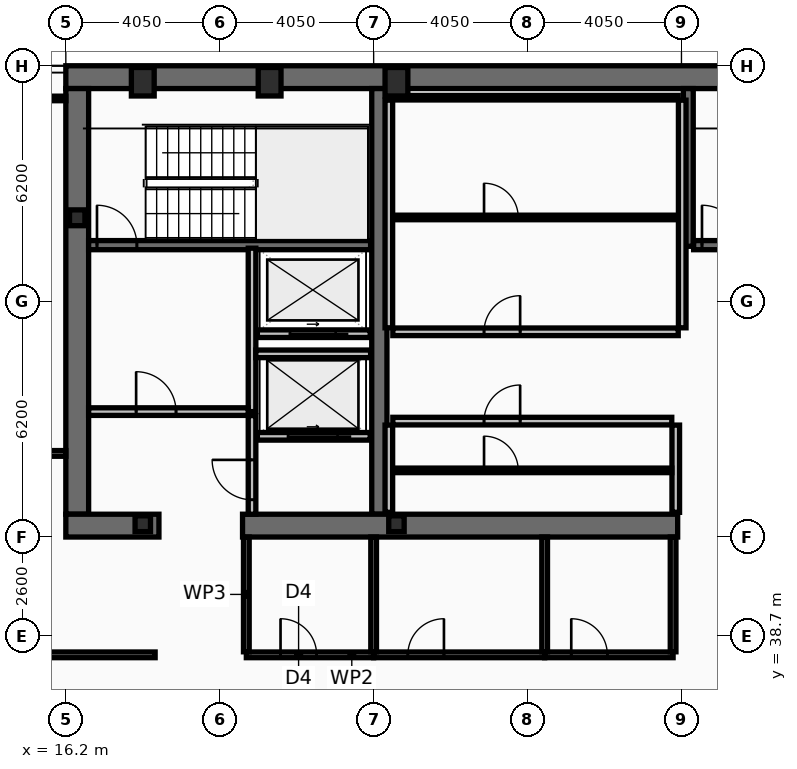
"""IFC4 building model, lengths in metres.
Left out: names, types, materials, properties, quantities, classifications, styles, units other than length and angle.
Written with IfcOpenShell. Run it as: python <this file> out.ifc"""

import sys

from ifc_helpers import new_model, si_unit, direction, frame, frame_2d, origin, origin_2d, place, context, subcontext, project, spatial, rectangle, hollow_rectangle, i_section, extrude, element, fill, save


model = new_model("IFC4")
c1 = context("Model", 3, precision=1e-05, world=origin(), true_north=direction((0.0, 1.0)))
c2 = subcontext(c1, "Body", "Model", "MODEL_VIEW")
j1 = project(units=[si_unit("LENGTHUNIT", "METRE"), si_unit("PLANEANGLEUNIT", "RADIAN")], contexts=[c1])
p1 = place(None, origin())
s1 = spatial("IfcSite", under=j1, at=p1, CompositionType="ELEMENT")
p2 = place(p1, origin())
s2 = spatial("IfcBuilding", under=s1, at=p2, CompositionType="ELEMENT")
p3 = place(p2, frame((0.0, 0.0, 192.2)))
s3 = spatial("IfcBuildingStorey", under=s2, at=p3, CompositionType="ELEMENT", Elevation=192.2)
p4 = place(p3, frame((16.2, 53.4, 0.0), z_axis=(0.0, 0.0, 1.0), x_axis=(1.0, 0.0, 0.0)))
e1 = element("IfcWall", 1, at=p4, inside=s3, PredefinedType="SHEAR", context=c2, shape_type="SweptSolid", body=[
    extrude(rectangle(XDim=40.5, YDim=0.6, at=frame_2d((20.25, 0.0))), origin(), (0.0, 0.0, 1.0), 3.44),
])
p5 = place(p3, frame((16.5, 41.9, 0.0), z_axis=(0.0, 0.0, 1.0), x_axis=(0.0, 1.0, 0.0)))
e2 = element("IfcWall", 2, at=p5, inside=s3, PredefinedType="SHEAR", context=c2, shape_type="SweptSolid", body=[
    extrude(rectangle(XDim=11.2, YDim=0.6, at=frame_2d((5.6, 0.0))), origin(), (0.0, 0.0, 1.0), 3.44),
])
p6 = place(p3, frame((24.45, 41.9, 0.0), z_axis=(0.0, 0.0, 1.0), x_axis=(0.0, 1.0, 0.0)))
e3 = element("IfcWall", 3, at=p6, inside=s3, PredefinedType="SHEAR", context=c2, shape_type="SweptSolid", body=[
    extrude(rectangle(XDim=11.2, YDim=0.4, at=frame_2d((5.6, 0.0))), origin(), (0.0, 0.0, 1.0), 3.44),
])
p7 = place(p3, frame((18.65, 41.6, 0.0), z_axis=(0.0, 0.0, 1.0), x_axis=(-1.0, 0.0, 0.0)))
e4 = element("IfcWall", 4, at=p7, inside=s3, PredefinedType="SHEAR", context=c2, shape_type="SweptSolid", body=[
    extrude(rectangle(XDim=2.45, YDim=0.6, at=frame_2d((1.225, 0.0))), origin(), (0.0, 0.0, 1.0), 3.44),
])
p8 = place(p3, frame((32.3, 41.6, 0.0), z_axis=(0.0, 0.0, 1.0), x_axis=(-1.0, 0.0, 0.0)))
e5 = element("IfcWall", 5, at=p8, inside=s3, PredefinedType="SHEAR", context=c2, shape_type="SweptSolid", body=[
    extrude(rectangle(XDim=11.45, YDim=0.6, at=frame_2d((5.725, 0.0))), origin(), (0.0, 0.0, 1.0), 3.44),
])
p9 = place(p3, frame((32.58, 48.95, 0.0), z_axis=(0.0, 0.0, 1.0), x_axis=(0.0, 1.0, 0.0)))
e6 = element("IfcWall", 6, at=p9, inside=s3, PredefinedType="SHEAR", context=c2, shape_type="SweptSolid", body=[
    extrude(rectangle(XDim=4.15, YDim=0.26, at=frame_2d((2.075, 0.0))), origin(), (0.0, 0.0, 1.0), 3.44),
])
p10 = place(p3, frame((16.8, 48.98, 0.0), z_axis=(0.0, 0.0, 1.0), x_axis=(1.0, 0.0, 0.0)))
e7 = element("IfcWall", 7, at=p10, inside=s3, PredefinedType="SHEAR", context=c2, shape_type="SweptSolid", body=[
    extrude(rectangle(XDim=7.42, YDim=0.24, at=frame_2d((3.71, 0.0))), origin(), (0.0, 0.0, 1.0), 3.44),
])
p11 = place(p10, frame((0.22, 0.0, 0.0)))
e8 = element("IfcOpeningElement", 8, at=p11, cuts=e7, PredefinedType="OPENING", context=c2, shape_type="SweptSolid", body=[
    extrude(rectangle(XDim=1.05, YDim=2.15, at=frame_2d((0.525, 1.075))), frame((0.0, 0.13, 0.0), z_axis=(0.0, -1.0, 0.0), x_axis=(1.0, 0.0, 0.0)), (0.0, 0.0, 1.0), 0.26),
])
p12 = place(p3, frame((32.72, 48.98, 0.0), z_axis=(0.0, 0.0, 1.0), x_axis=(1.0, 0.0, 0.0)))
e9 = element("IfcWall", 9, at=p12, inside=s3, PredefinedType="SHEAR", context=c2, shape_type="SweptSolid", body=[
    extrude(rectangle(XDim=7.56, YDim=0.24, at=frame_2d((3.78, 0.0))), origin(), (0.0, 0.0, 1.0), 3.44),
])
p13 = place(p12, frame((0.22, 0.0, 0.0)))
e10 = element("IfcOpeningElement", 10, at=p13, cuts=e9, PredefinedType="OPENING", context=c2, shape_type="SweptSolid", body=[
    extrude(rectangle(XDim=1.05, YDim=2.15, at=frame_2d((0.525, 1.075))), frame((0.0, 0.13, 0.0), z_axis=(0.0, -1.0, 0.0), x_axis=(1.0, 0.0, 0.0)), (0.0, 0.0, 1.0), 0.26),
])
for number, where, z_axis, x_axis in (
    (11, (18.225, 53.28, 0.0), (0.0, 0.0, 1.0), (1.0, 0.0, 0.0)),
    (12, (21.562, 53.28, 0.0), (0.0, 0.0, 1.0), (1.0, 0.0, 0.0)),
    (13, (24.9, 53.28, 0.0), (0.0, 0.0, 1.0), (1.0, 0.0, 0.0)),
):
    element("IfcColumn", number, at=place(p3, frame(where, z_axis=z_axis, x_axis=x_axis)), inside=s3, PredefinedType="COLUMN", context=c2, shape_type="SweptSolid", body=[
        extrude(hollow_rectangle(XDim=0.6, YDim=0.75, WallThickness=0.045, at=origin_2d()), origin(), (0.0, 0.0, 1.0), 3.6),
    ])
for number, where, z_axis, x_axis in (
    (14, (16.5, 49.7, 0.0), (0.0, 0.0, 1.0), (1.0, 0.0, 0.0)),
    (15, (18.225, 41.65, 0.0), (0.0, 0.0, 1.0), (1.0, 0.0, 0.0)),
    (16, (24.9, 41.65, 0.0), (0.0, 0.0, 1.0), (1.0, 0.0, 0.0)),
):
    element("IfcColumn", number, at=place(p3, frame(where, z_axis=z_axis, x_axis=x_axis)), inside=s3, PredefinedType="COLUMN", context=c2, shape_type="SweptSolid", body=[
        extrude(i_section(OverallWidth=0.406, OverallDepth=0.416, WebThickness=0.03, FlangeThickness=0.048, at=origin_2d()), origin(), (0.0, 0.0, 1.0), 3.6),
    ])
p14 = place(p3, frame((24.21, 43.95, 0.0), z_axis=(0.0, 0.0, 1.0), x_axis=(-1.0, 0.0, 0.0)))
e17 = element("IfcWall", 17, at=p14, inside=s3, PredefinedType="PARTITIONING", context=c2, shape_type="SweptSolid", body=[
    extrude(rectangle(XDim=2.97, YDim=0.2, at=frame_2d((1.485, 0.0))), origin(), (0.0, 0.0, 1.0), 3.44),
])
p15 = place(p14, frame((0.86, 0.0, 0.0)))
e18 = element("IfcOpeningElement", 18, at=p15, cuts=e17, PredefinedType="OPENING", context=c2, shape_type="SweptSolid", body=[
    extrude(rectangle(XDim=1.3, YDim=2.18, at=frame_2d((0.65, 1.09))), frame((0.0, 0.11, 0.0), z_axis=(0.0, -1.0, 0.0), x_axis=(1.0, 0.0, 0.0)), (0.0, 0.0, 1.0), 0.22),
])
p16 = place(p3, frame((24.21, 46.65, 0.0), z_axis=(0.0, 0.0, 1.0), x_axis=(-1.0, 0.0, 0.0)))
e19 = element("IfcWall", 19, at=p16, inside=s3, PredefinedType="PARTITIONING", context=c2, shape_type="SweptSolid", body=[
    extrude(rectangle(XDim=2.97, YDim=0.2, at=frame_2d((1.485, 0.0))), origin(), (0.0, 0.0, 1.0), 3.44),
])
p17 = place(p16, frame((0.91, 0.0, 0.0)))
e20 = element("IfcOpeningElement", 20, at=p17, cuts=e19, PredefinedType="OPENING", context=c2, shape_type="SweptSolid", body=[
    extrude(rectangle(XDim=1.2, YDim=2.18, at=frame_2d((0.6, 1.09))), frame((0.0, 0.11, 0.0), z_axis=(0.0, -1.0, 0.0), x_axis=(1.0, 0.0, 0.0)), (0.0, 0.0, 1.0), 0.22),
])
p18 = place(p3, frame((21.1, 44.6, 0.0), z_axis=(0.0, 0.0, 1.0), x_axis=(0.0, 1.0, 0.0)))
e21 = element("IfcWall", 21, at=p18, inside=s3, PredefinedType="PARTITIONING", context=c2, shape_type="SweptSolid", body=[
    extrude(rectangle(XDim=4.3, YDim=0.2, at=frame_2d((2.15, 0.0))), origin(), (0.0, 0.0, 1.0), 3.44),
])
p19 = place(p3, frame((16.8, 44.6, 0.0), z_axis=(0.0, 0.0, 1.0), x_axis=(1.0, 0.0, 0.0)))
e22 = element("IfcWall", 22, at=p19, inside=s3, PredefinedType="PARTITIONING", context=c2, shape_type="SweptSolid", body=[
    extrude(rectangle(XDim=4.2, YDim=0.2, at=frame_2d((2.1, 0.0))), origin(), (0.0, 0.0, 1.0), 3.44),
])
p20 = place(p19, frame((1.25, 0.0, 0.0)))
e23 = element("IfcOpeningElement", 23, at=p20, cuts=e22, PredefinedType="OPENING", context=c2, shape_type="SweptSolid", body=[
    extrude(rectangle(XDim=1.05, YDim=2.15, at=frame_2d((0.525, 1.075))), frame((0.0, 0.11, 0.0), z_axis=(0.0, -1.0, 0.0), x_axis=(1.0, 0.0, 0.0)), (0.0, 0.0, 1.0), 0.22),
])
p21 = place(p3, frame((21.2, 46.12, 0.0), z_axis=(0.0, 0.0, 1.0), x_axis=(1.0, 0.0, 0.0)))
e24 = element("IfcWall", 24, at=p21, inside=s3, PredefinedType="PARTITIONING", context=c2, shape_type="SweptSolid", body=[
    extrude(rectangle(XDim=3.02, YDim=0.2, at=frame_2d((1.51, 0.0))), origin(), (0.0, 0.0, 1.0), 3.44),
])
p22 = place(p3, frame((21.1, 41.9, 0.0), z_axis=(0.0, 0.0, 1.0), x_axis=(0.0, 1.0, 0.0)))
e25 = element("IfcWall", 25, at=p22, inside=s3, PredefinedType="PARTITIONING", context=c2, shape_type="SweptSolid", body=[
    extrude(rectangle(XDim=2.595, YDim=0.2, at=frame_2d((1.298, 0.0))), origin(), (0.0, 0.0, 1.0), 3.44),
])
p23 = place(p22, frame((0.38, 0.0, 0.0)))
e26 = element("IfcOpeningElement", 26, at=p23, cuts=e25, PredefinedType="OPENING", context=c2, shape_type="SweptSolid", body=[
    extrude(rectangle(XDim=1.05, YDim=2.15, at=frame_2d((0.525, 1.075))), frame((0.0, 0.11, 0.0), z_axis=(0.0, -1.0, 0.0), x_axis=(1.0, 0.0, 0.0)), (0.0, 0.0, 1.0), 0.22),
])
for number, where, z_axis, x_axis in (
    (27, (24.7, 46.805, 0.0), (0.0, 0.0, 1.0), (0.0, 1.0, 0.0)),
    (28, (32.42, 46.805, 0.0), (0.0, 0.0, 1.0), (0.0, 1.0, 0.0)),
):
    element("IfcWall", number, at=place(p3, frame(where, z_axis=z_axis, x_axis=x_axis)), inside=s3, PredefinedType="PARTITIONING", context=c2, shape_type="SweptSolid", body=[
        extrude(rectangle(XDim=5.99, YDim=0.2, at=frame_2d((2.995, 0.0))), origin(), (0.0, 0.0, 1.0), 3.44),
    ])
p24 = place(p3, frame((24.805, 52.86, 0.0), z_axis=(0.0, 0.0, 1.0), x_axis=(1.0, 0.0, 0.0)))
e29 = element("IfcWall", 29, at=p24, inside=s3, PredefinedType="PARTITIONING", context=c2, shape_type="SweptSolid", body=[
    extrude(rectangle(XDim=7.51, YDim=0.12, at=frame_2d((3.755, 0.0))), origin(), (0.0, 0.0, 1.0), 3.44),
])
p25 = place(p3, frame((24.805, 49.709, 0.0), z_axis=(0.0, 0.0, 1.0), x_axis=(1.0, 0.0, 0.0)))
e30 = element("IfcWall", 30, at=p25, inside=s3, PredefinedType="PARTITIONING", context=c2, shape_type="SweptSolid", body=[
    extrude(rectangle(XDim=7.51, YDim=0.12, at=frame_2d((3.755, 0.0))), origin(), (0.0, 0.0, 1.0), 3.44),
])
p26 = place(p25, frame((2.4, 0.0, 0.0)))
e31 = element("IfcOpeningElement", 31, at=p26, cuts=e30, PredefinedType="OPENING", context=c2, shape_type="SweptSolid", body=[
    extrude(rectangle(XDim=0.9, YDim=2.05, at=frame_2d((0.45, 1.025))), frame((0.0, 0.07, 0.0), z_axis=(0.0, -1.0, 0.0), x_axis=(1.0, 0.0, 0.0)), (0.0, 0.0, 1.0), 0.14),
])
p27 = place(p3, frame((24.805, 46.7, 0.0), z_axis=(0.0, 0.0, 1.0), x_axis=(1.0, 0.0, 0.0)))
e32 = element("IfcWall", 32, at=p27, inside=s3, PredefinedType="PARTITIONING", context=c2, shape_type="SweptSolid", body=[
    extrude(rectangle(XDim=7.51, YDim=0.2, at=frame_2d((3.755, 0.0))), origin(), (0.0, 0.0, 1.0), 3.44),
])
p28 = place(p27, frame((2.4, 0.0, 0.0)))
e33 = element("IfcOpeningElement", 33, at=p28, cuts=e32, PredefinedType="OPENING", context=c2, shape_type="SweptSolid", body=[
    extrude(rectangle(XDim=0.95, YDim=2.1, at=frame_2d((0.475, 1.05))), frame((0.0, 0.11, 0.0), z_axis=(0.0, -1.0, 0.0), x_axis=(1.0, 0.0, 0.0)), (0.0, 0.0, 1.0), 0.22),
])
for number, where, z_axis, x_axis in (
    (34, (24.7, 41.95, 0.0), (0.0, 0.0, 1.0), (0.0, 1.0, 0.0)),
    (35, (32.25, 41.95, 0.0), (0.0, 0.0, 1.0), (0.0, 1.0, 0.0)),
):
    element("IfcWall", number, at=place(p3, frame(where, z_axis=z_axis, x_axis=x_axis)), inside=s3, PredefinedType="PARTITIONING", context=c2, shape_type="SweptSolid", body=[
        extrude(rectangle(XDim=2.295, YDim=0.2, at=frame_2d((1.147, 0.0))), origin(), (0.0, 0.0, 1.0), 3.44),
    ])
p29 = place(p3, frame((24.805, 43.054, 0.0), z_axis=(0.0, 0.0, 1.0), x_axis=(1.0, 0.0, 0.0)))
e36 = element("IfcWall", 36, at=p29, inside=s3, PredefinedType="PARTITIONING", context=c2, shape_type="SweptSolid", body=[
    extrude(rectangle(XDim=7.34, YDim=0.12, at=frame_2d((3.67, 0.0))), origin(), (0.0, 0.0, 1.0), 3.44),
])
p30 = place(p29, frame((2.4, 0.0, 0.0)))
e37 = element("IfcOpeningElement", 37, at=p30, cuts=e36, PredefinedType="OPENING", context=c2, shape_type="SweptSolid", body=[
    extrude(rectangle(XDim=0.9, YDim=2.05, at=frame_2d((0.45, 1.025))), frame((0.0, 0.07, 0.0), z_axis=(0.0, -1.0, 0.0), x_axis=(1.0, 0.0, 0.0)), (0.0, 0.0, 1.0), 0.14),
])
p31 = place(p3, frame((24.805, 44.35, 0.0), z_axis=(0.0, 0.0, 1.0), x_axis=(1.0, 0.0, 0.0)))
e38 = element("IfcWall", 38, at=p31, inside=s3, PredefinedType="PARTITIONING", context=c2, shape_type="SweptSolid", body=[
    extrude(rectangle(XDim=7.34, YDim=0.2, at=frame_2d((3.67, 0.0))), origin(), (0.0, 0.0, 1.0), 3.44),
])
p32 = place(p31, frame((2.4, 0.0, 0.0)))
e39 = element("IfcOpeningElement", 39, at=p32, cuts=e38, PredefinedType="OPENING", context=c2, shape_type="SweptSolid", body=[
    extrude(rectangle(XDim=0.95, YDim=2.1, at=frame_2d((0.475, 1.05))), frame((0.0, 0.11, 0.0), z_axis=(0.0, -1.0, 0.0), x_axis=(1.0, 0.0, 0.0)), (0.0, 0.0, 1.0), 0.22),
])
p33 = place(p3, frame((20.95, 38.2, 0.0), z_axis=(0.0, 0.0, 1.0), x_axis=(1.0, 0.0, 0.0)))
e40 = element("IfcWall", 40, at=p33, inside=s3, PredefinedType="PARTITIONING", context=c2, shape_type="SweptSolid", body=[
    extrude(rectangle(XDim=3.35, YDim=0.15, at=frame_2d((1.675, 0.0))), origin(), (0.0, 0.0, 1.0), 3.44),
])
p34 = place(p33, frame((0.9, 0.0, 0.0)))
e41 = element("IfcOpeningElement", 41, at=p34, cuts=e40, PredefinedType="OPENING", context=c2, shape_type="SweptSolid", body=[
    extrude(rectangle(XDim=0.95, YDim=2.05, at=frame_2d((0.475, 1.025))), frame((0.0, 0.085, 0.0), z_axis=(0.0, -1.0, 0.0), x_axis=(1.0, 0.0, 0.0)), (0.0, 0.0, 1.0), 0.17),
])
p35 = place(p3, frame((24.3, 38.2, 0.0), z_axis=(0.0, 0.0, 1.0), x_axis=(1.0, 0.0, 0.0)))
e42 = element("IfcWall", 42, at=p35, inside=s3, PredefinedType="PARTITIONING", context=c2, shape_type="SweptSolid", body=[
    extrude(rectangle(XDim=4.5, YDim=0.15, at=frame_2d((2.25, 0.0))), origin(), (0.0, 0.0, 1.0), 2.73),
])
p36 = place(p35, frame((0.9, 0.0, 0.0)))
e43 = element("IfcOpeningElement", 43, at=p36, cuts=e42, PredefinedType="OPENING", context=c2, shape_type="SweptSolid", body=[
    extrude(rectangle(XDim=0.95, YDim=2.05, at=frame_2d((0.475, 1.025))), frame((0.0, 0.085, 0.0), z_axis=(0.0, -1.0, 0.0), x_axis=(1.0, 0.0, 0.0)), (0.0, 0.0, 1.0), 0.17),
])
p37 = place(p3, frame((28.8, 38.2, 0.0), z_axis=(0.0, 0.0, 1.0), x_axis=(1.0, 0.0, 0.0)))
e44 = element("IfcWall", 44, at=p37, inside=s3, PredefinedType="PARTITIONING", context=c2, shape_type="SweptSolid", body=[
    extrude(rectangle(XDim=3.38, YDim=0.15, at=frame_2d((1.69, 0.0))), origin(), (0.0, 0.0, 1.0), 2.73),
])
p38 = place(p37, frame((0.7, 0.0, 0.0)))
e45 = element("IfcOpeningElement", 45, at=p38, cuts=e44, PredefinedType="OPENING", context=c2, shape_type="SweptSolid", body=[
    extrude(rectangle(XDim=0.95, YDim=2.05, at=frame_2d((0.475, 1.025))), frame((0.0, 0.085, 0.0), z_axis=(0.0, -1.0, 0.0), x_axis=(1.0, 0.0, 0.0)), (0.0, 0.0, 1.0), 0.17),
])
for number, where, z_axis, x_axis in (
    (46, (20.95, 38.28, 0.0), (0.0, 0.0, 1.0), (0.0, 1.0, 0.0)),
    (47, (24.3, 38.28, 0.0), (0.0, 0.0, 1.0), (0.0, 1.0, 0.0)),
    (48, (28.8, 38.28, 0.0), (0.0, 0.0, 1.0), (0.0, 1.0, 0.0)),
    (49, (32.18, 38.28, 0.0), (0.0, 0.0, 1.0), (0.0, 1.0, 0.0)),
):
    element("IfcWall", number, at=place(p3, frame(where, z_axis=z_axis, x_axis=x_axis)), inside=s3, PredefinedType="PARTITIONING", context=c2, shape_type="SweptSolid", body=[
        extrude(rectangle(XDim=3.02, YDim=0.15, at=frame_2d((1.51, 0.0))), origin(), (0.0, 0.0, 1.0), 3.44),
    ])
p39 = place(p3, frame((8.03, 38.2, 0.0), z_axis=(0.0, 0.0, 1.0), x_axis=(1.0, 0.0, 0.0)))
e50 = element("IfcWall", 50, at=p39, inside=s3, PredefinedType="PARTITIONING", context=c2, shape_type="SweptSolid", body=[
    extrude(rectangle(XDim=10.52, YDim=0.15, at=frame_2d((5.26, 0.0))), origin(), (0.0, 0.0, 1.0), 2.73),
])
p40 = place(p39, frame((6.32, 0.0, 0.0)))
e51 = element("IfcOpeningElement", 51, at=p40, cuts=e50, PredefinedType="OPENING", context=c2, shape_type="SweptSolid", body=[
    extrude(rectangle(XDim=0.95, YDim=2.05, at=frame_2d((0.475, 1.025))), frame((0.0, 0.085, 0.0), z_axis=(0.0, -1.0, 0.0), x_axis=(1.0, 0.0, 0.0)), (0.0, 0.0, 1.0), 0.17),
])
p41 = place(p3, frame((8.095, 43.5, 0.0), z_axis=(0.0, 0.0, 1.0), x_axis=(1.0, 0.0, 0.0)))
e52 = element("IfcWall", 52, at=p41, inside=s3, PredefinedType="PARTITIONING", context=c2, shape_type="SweptSolid", body=[
    extrude(rectangle(XDim=8.105, YDim=0.15, at=frame_2d((4.052, 0.0))), origin(), (0.0, 0.0, 1.0), 2.73),
])
p42 = place(p41, frame((6.32, 0.0, 0.0)))
e53 = element("IfcOpeningElement", 53, at=p42, cuts=e52, PredefinedType="OPENING", context=c2, shape_type="SweptSolid", body=[
    extrude(rectangle(XDim=0.9, YDim=2.05, at=frame_2d((0.45, 1.025))), frame((0.0, 0.085, 0.0), z_axis=(0.0, -1.0, 0.0), x_axis=(1.0, 0.0, 0.0)), (0.0, 0.0, 1.0), 0.17),
])
p43 = place(p3, frame((8.095, 52.84, 0.0), z_axis=(0.0, 0.0, 1.0), x_axis=(1.0, 0.0, 0.0)))
e54 = element("IfcWall", 54, at=p43, inside=s3, PredefinedType="PARTITIONING", context=c2, shape_type="SweptSolid", body=[
    extrude(rectangle(XDim=8.105, YDim=0.12, at=frame_2d((4.052, 0.0))), origin(), (0.0, 0.0, 1.0), 3.44),
])
p44 = place(p11, origin())
e55 = element("IfcDoor", 55, at=p44, inside=s3, OperationType="SINGLE_SWING_LEFT", PredefinedType="DOOR", context=c2, shape_type="SweptSolid", body=[
    extrude(rectangle(XDim=1.05, YDim=2.15, at=frame_2d((0.525, 1.075))), frame((0.0, 0.025, 0.0), z_axis=(0.0, -1.0, 0.0), x_axis=(1.0, 0.0, 0.0)), (0.0, 0.0, 1.0), 0.05),
])
fill(e8, e55)
p45 = place(p13, origin())
e56 = element("IfcDoor", 56, at=p45, inside=s3, OperationType="SINGLE_SWING_LEFT", PredefinedType="DOOR", context=c2, shape_type="SweptSolid", body=[
    extrude(rectangle(XDim=1.05, YDim=2.15, at=frame_2d((0.525, 1.075))), frame((0.0, 0.025, 0.0), z_axis=(0.0, -1.0, 0.0), x_axis=(1.0, 0.0, 0.0)), (0.0, 0.0, 1.0), 0.05),
])
fill(e10, e56)
p46 = place(p15, origin())
e57 = element("IfcDoor", 57, at=p46, inside=s3, OperationType="SLIDING_TO_LEFT", PredefinedType="DOOR", context=c2, shape_type="SweptSolid", body=[
    extrude(rectangle(XDim=1.3, YDim=2.18, at=frame_2d((0.65, 1.09))), frame((0.0, 0.025, 0.0), z_axis=(0.0, -1.0, 0.0), x_axis=(1.0, 0.0, 0.0)), (0.0, 0.0, 1.0), 0.05),
])
fill(e18, e57)
p47 = place(p17, origin())
e58 = element("IfcDoor", 58, at=p47, inside=s3, OperationType="SLIDING_TO_LEFT", PredefinedType="DOOR", context=c2, shape_type="SweptSolid", body=[
    extrude(rectangle(XDim=1.2, YDim=2.18, at=frame_2d((0.6, 1.09))), frame((0.0, 0.025, 0.0), z_axis=(0.0, -1.0, 0.0), x_axis=(1.0, 0.0, 0.0)), (0.0, 0.0, 1.0), 0.05),
])
fill(e20, e58)
p48 = place(p20, origin())
e59 = element("IfcDoor", 59, at=p48, inside=s3, OperationType="SINGLE_SWING_LEFT", PredefinedType="DOOR", context=c2, shape_type="SweptSolid", body=[
    extrude(rectangle(XDim=1.05, YDim=2.15, at=frame_2d((0.525, 1.075))), frame((0.0, 0.025, 0.0), z_axis=(0.0, -1.0, 0.0), x_axis=(1.0, 0.0, 0.0)), (0.0, 0.0, 1.0), 0.05),
])
fill(e23, e59)
p49 = place(p23, origin())
e60 = element("IfcDoor", 60, at=p49, inside=s3, OperationType="SINGLE_SWING_RIGHT", PredefinedType="DOOR", context=c2, shape_type="SweptSolid", body=[
    extrude(rectangle(XDim=1.05, YDim=2.15, at=frame_2d((0.525, 1.075))), frame((0.0, 0.025, 0.0), z_axis=(0.0, -1.0, 0.0), x_axis=(1.0, 0.0, 0.0)), (0.0, 0.0, 1.0), 0.05),
])
fill(e26, e60)
p50 = place(p26, origin())
e61 = element("IfcDoor", 61, at=p50, inside=s3, OperationType="SINGLE_SWING_LEFT", PredefinedType="DOOR", context=c2, shape_type="SweptSolid", body=[
    extrude(rectangle(XDim=0.9, YDim=2.05, at=frame_2d((0.45, 1.025))), frame((0.0, 0.025, 0.0), z_axis=(0.0, -1.0, 0.0), x_axis=(1.0, 0.0, 0.0)), (0.0, 0.0, 1.0), 0.05),
])
fill(e31, e61)
p51 = place(p28, origin())
e62 = element("IfcDoor", 62, at=p51, inside=s3, OperationType="SINGLE_SWING_RIGHT", PredefinedType="DOOR", context=c2, shape_type="SweptSolid", body=[
    extrude(rectangle(XDim=0.95, YDim=2.1, at=frame_2d((0.475, 1.05))), frame((0.0, 0.025, 0.0), z_axis=(0.0, -1.0, 0.0), x_axis=(1.0, 0.0, 0.0)), (0.0, 0.0, 1.0), 0.05),
])
fill(e33, e62)
p52 = place(p30, origin())
e63 = element("IfcDoor", 63, at=p52, inside=s3, OperationType="SINGLE_SWING_LEFT", PredefinedType="DOOR", context=c2, shape_type="SweptSolid", body=[
    extrude(rectangle(XDim=0.9, YDim=2.05, at=frame_2d((0.45, 1.025))), frame((0.0, 0.025, 0.0), z_axis=(0.0, -1.0, 0.0), x_axis=(1.0, 0.0, 0.0)), (0.0, 0.0, 1.0), 0.05),
])
fill(e37, e63)
p53 = place(p32, origin())
e64 = element("IfcDoor", 64, at=p53, inside=s3, OperationType="SINGLE_SWING_RIGHT", PredefinedType="DOOR", context=c2, shape_type="SweptSolid", body=[
    extrude(rectangle(XDim=0.95, YDim=2.1, at=frame_2d((0.475, 1.05))), frame((0.0, 0.025, 0.0), z_axis=(0.0, -1.0, 0.0), x_axis=(1.0, 0.0, 0.0)), (0.0, 0.0, 1.0), 0.05),
])
fill(e39, e64)
p54 = place(p34, origin())
e65 = element("IfcDoor", 65, at=p54, inside=s3, OperationType="SINGLE_SWING_LEFT", PredefinedType="DOOR", context=c2, shape_type="SweptSolid", body=[
    extrude(rectangle(XDim=0.95, YDim=2.05, at=frame_2d((0.475, 1.025))), frame((0.0, 0.025, 0.0), z_axis=(0.0, -1.0, 0.0), x_axis=(1.0, 0.0, 0.0)), (0.0, 0.0, 1.0), 0.05),
])
fill(e41, e65)
p55 = place(p36, origin())
e66 = element("IfcDoor", 66, at=p55, inside=s3, OperationType="SINGLE_SWING_RIGHT", PredefinedType="DOOR", context=c2, shape_type="SweptSolid", body=[
    extrude(rectangle(XDim=0.95, YDim=2.05, at=frame_2d((0.475, 1.025))), frame((0.0, 0.025, 0.0), z_axis=(0.0, -1.0, 0.0), x_axis=(1.0, 0.0, 0.0)), (0.0, 0.0, 1.0), 0.05),
])
fill(e43, e66)
p56 = place(p38, origin())
e67 = element("IfcDoor", 67, at=p56, inside=s3, OperationType="SINGLE_SWING_LEFT", PredefinedType="DOOR", context=c2, shape_type="SweptSolid", body=[
    extrude(rectangle(XDim=0.95, YDim=2.05, at=frame_2d((0.475, 1.025))), frame((0.0, 0.025, 0.0), z_axis=(0.0, -1.0, 0.0), x_axis=(1.0, 0.0, 0.0)), (0.0, 0.0, 1.0), 0.05),
])
fill(e45, e67)
save(model, sys.argv[1])
